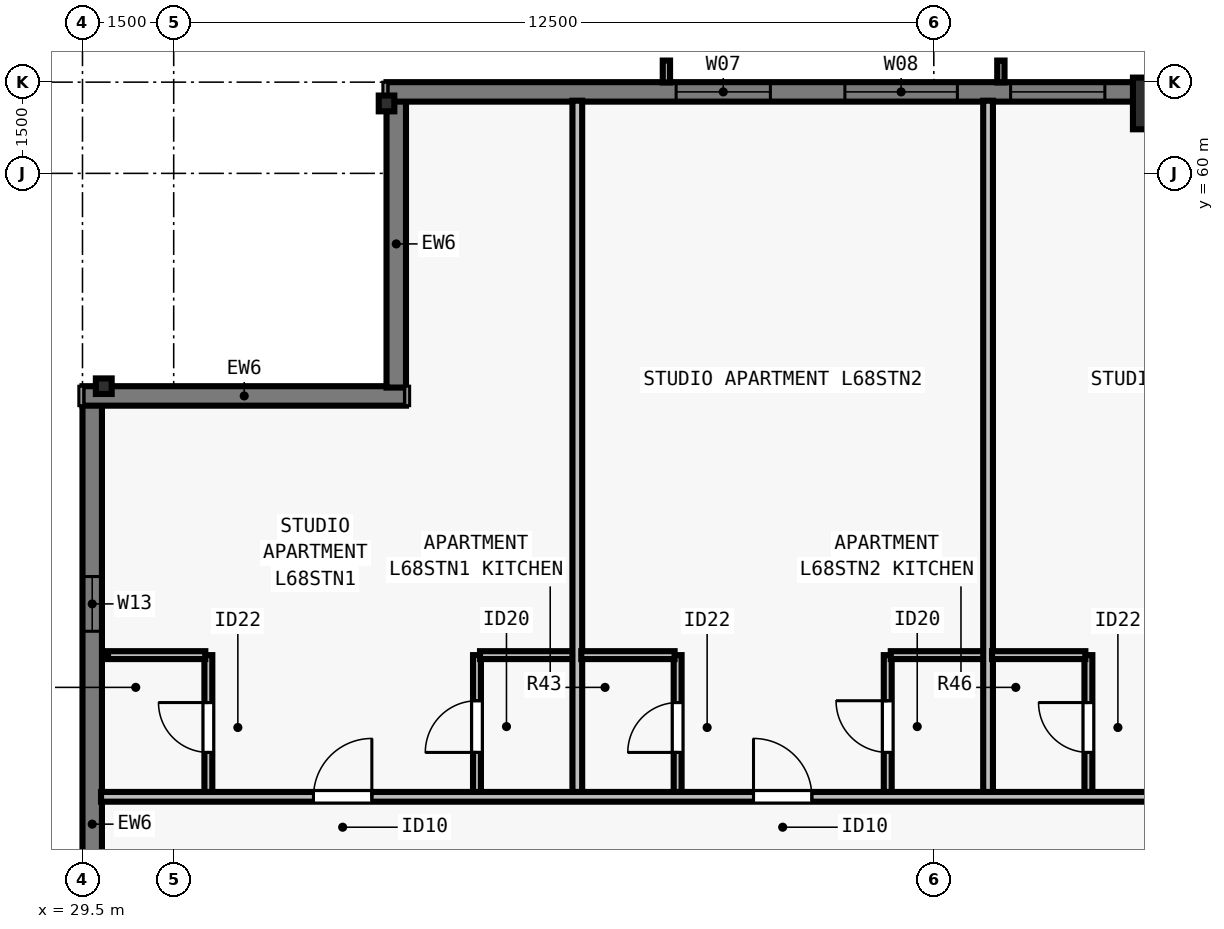
"""IFC4 building model, lengths in metres.
Left out: names, types, materials, properties, quantities, classifications, styles, units other than length and angle.
Written with IfcOpenShell. Run it as: python <this file> out.ifc"""

import sys

from ifc_helpers import new_model, si_unit, direction, frame, frame_2d, origin, origin_2d, place, context, subcontext, project, spatial, rectangle, i_section, extrude, element, fill, save


model = new_model("IFC4")
c1 = context("Model", 3, precision=1e-05, world=origin(), true_north=direction((0.0, 1.0)))
c2 = subcontext(c1, "Body", "Model", "MODEL_VIEW")
j1 = project(units=[si_unit("LENGTHUNIT", "METRE"), si_unit("PLANEANGLEUNIT", "RADIAN")], contexts=[c1])
p1 = place(None, origin())
s1 = spatial("IfcSite", under=j1, at=p1, CompositionType="ELEMENT")
p2 = place(p1, origin())
s2 = spatial("IfcBuilding", under=s1, at=p2, CompositionType="ELEMENT")
p3 = place(p2, frame((0.0, 0.0, 248.0)))
s3 = spatial("IfcBuildingStorey", under=s2, at=p3, CompositionType="ELEMENT", Elevation=248.0)
p4 = place(p3, frame((47.2, 61.15, 0.0), z_axis=(0.0, 0.0, 1.0), x_axis=(1.0, 0.0, 0.0)))
e1 = element("IfcColumn", 1, at=p4, inside=s3, PredefinedType="COLUMN", context=c2, shape_type="SweptSolid", body=[
    extrude(rectangle(XDim=0.85, YDim=0.85, at=origin_2d()), origin(), (0.0, 0.0, 1.0), 3.5),
])
for number, where, z_axis, x_axis in (
    (2, (34.5, 61.15, 0.0), (0.0, 0.0, 1.0), (1.0, 0.0, 0.0)),
    (3, (29.85, 56.5, 0.0), (0.0, 0.0, 1.0), (0.0, 1.0, 0.0)),
):
    element("IfcColumn", number, at=place(p3, frame(where, z_axis=z_axis, x_axis=x_axis)), inside=s3, PredefinedType="COLUMN", context=c2, shape_type="SweptSolid", body=[
        extrude(i_section(OverallWidth=0.256, OverallDepth=0.26, WebThickness=0.01, FlangeThickness=0.017, FilletRadius=0.013, at=origin_2d()), origin(), (0.0, 0.0, 1.0), 3.5),
    ])
p5 = place(p3, frame((29.66, 32.0, 0.0), z_axis=(0.0, 0.0, 1.0), x_axis=(0.0, 1.0, 0.0)))
e4 = element("IfcWall", 4, at=p5, inside=s3, PredefinedType="SOLIDWALL", context=c2, shape_type="SweptSolid", body=[
    extrude(rectangle(XDim=24.202, YDim=0.32, at=frame_2d((12.101, 0.0))), origin(), (0.0, 0.0, 1.0), 3.29),
])
p6 = place(p5, frame((4.275, 0.0, 0.8)))
e5 = element("IfcOpeningElement", 5, at=p6, cuts=e4, PredefinedType="OPENING", context=c2, shape_type="SweptSolid", body=[
    extrude(rectangle(XDim=1.55, YDim=1.678, at=frame_2d((0.775, 0.839))), frame((0.0, 0.17, 0.0), z_axis=(0.0, -1.0, 0.0), x_axis=(1.0, 0.0, 0.0)), (0.0, 0.0, 1.0), 0.34),
])
p7 = place(p5, frame((7.426, 0.0, 0.8)))
e6 = element("IfcOpeningElement", 6, at=p7, cuts=e4, PredefinedType="OPENING", context=c2, shape_type="SweptSolid", body=[
    extrude(rectangle(XDim=1.85, YDim=1.678, at=frame_2d((0.925, 0.839))), frame((0.0, 0.17, 0.0), z_axis=(0.0, -1.0, 0.0), x_axis=(1.0, 0.0, 0.0)), (0.0, 0.0, 1.0), 0.34),
])
p8 = place(p5, frame((12.576, 0.0, 0.8)))
e7 = element("IfcOpeningElement", 7, at=p8, cuts=e4, PredefinedType="OPENING", context=c2, shape_type="SweptSolid", body=[
    extrude(rectangle(XDim=1.55, YDim=1.678, at=frame_2d((0.775, 0.839))), frame((0.0, 0.17, 0.0), z_axis=(0.0, -1.0, 0.0), x_axis=(1.0, 0.0, 0.0)), (0.0, 0.0, 1.0), 0.34),
])
p9 = place(p5, frame((20.47, 0.0, 0.8)))
e8 = element("IfcOpeningElement", 8, at=p9, cuts=e4, PredefinedType="OPENING", context=c2, shape_type="SweptSolid", body=[
    extrude(rectangle(XDim=0.9, YDim=1.678, at=frame_2d((0.45, 0.839))), frame((0.0, 0.17, 0.0), z_axis=(0.0, -1.0, 0.0), x_axis=(1.0, 0.0, 0.0)), (0.0, 0.0, 1.0), 0.34),
])
p10 = place(p3, frame((29.5, 56.34, 0.0), z_axis=(0.0, 0.0, 1.0), x_axis=(1.0, 0.0, 0.0)))
e9 = element("IfcWall", 9, at=p10, inside=s3, PredefinedType="SOLIDWALL", context=c2, shape_type="SweptSolid", body=[
    extrude(rectangle(XDim=5.32, YDim=0.32, at=frame_2d((2.66, 0.0))), origin(), (0.0, 0.0, 1.0), 3.29),
])
p11 = place(p3, frame((34.66, 56.478, 0.0), z_axis=(0.0, 0.0, 1.0), x_axis=(0.0, 1.0, 0.0)))
e10 = element("IfcWall", 10, at=p11, inside=s3, PredefinedType="SOLIDWALL", context=c2, shape_type="SweptSolid", body=[
    extrude(rectangle(XDim=4.724, YDim=0.32, at=frame_2d((2.362, 0.0))), origin(), (0.0, 0.0, 1.0), 3.29),
])
p12 = place(p3, frame((34.5, 61.34, 0.0), z_axis=(0.0, 0.0, 1.0), x_axis=(1.0, 0.0, 0.0)))
e11 = element("IfcWall", 11, at=p12, inside=s3, PredefinedType="SOLIDWALL", context=c2, shape_type="SweptSolid", body=[
    extrude(rectangle(XDim=34.702, YDim=0.32, at=frame_2d((17.351, 0.0))), origin(), (0.0, 0.0, 1.0), 3.29),
])
p13 = place(p12, frame((4.763, 0.0, 0.8)))
e12 = element("IfcOpeningElement", 12, at=p13, cuts=e11, PredefinedType="OPENING", context=c2, shape_type="SweptSolid", body=[
    extrude(rectangle(XDim=1.55, YDim=1.678, at=frame_2d((0.775, 0.839))), frame((0.0, 0.17, 0.0), z_axis=(0.0, -1.0, 0.0), x_axis=(1.0, 0.0, 0.0)), (0.0, 0.0, 1.0), 0.34),
])
p14 = place(p12, frame((7.538, 0.0, 0.8)))
e13 = element("IfcOpeningElement", 13, at=p14, cuts=e11, PredefinedType="OPENING", context=c2, shape_type="SweptSolid", body=[
    extrude(rectangle(XDim=1.85, YDim=1.678, at=frame_2d((0.925, 0.839))), frame((0.0, 0.17, 0.0), z_axis=(0.0, -1.0, 0.0), x_axis=(1.0, 0.0, 0.0)), (0.0, 0.0, 1.0), 0.34),
])
p15 = place(p12, frame((10.263, 0.0, 0.8)))
e14 = element("IfcOpeningElement", 14, at=p15, cuts=e11, PredefinedType="OPENING", context=c2, shape_type="SweptSolid", body=[
    extrude(rectangle(XDim=1.55, YDim=1.678, at=frame_2d((0.775, 0.839))), frame((0.0, 0.17, 0.0), z_axis=(0.0, -1.0, 0.0), x_axis=(1.0, 0.0, 0.0)), (0.0, 0.0, 1.0), 0.34),
])
p16 = place(p12, frame((14.738, 0.0, 0.8)))
e15 = element("IfcOpeningElement", 15, at=p16, cuts=e11, PredefinedType="OPENING", context=c2, shape_type="SweptSolid", body=[
    extrude(rectangle(XDim=1.85, YDim=1.678, at=frame_2d((0.925, 0.839))), frame((0.0, 0.17, 0.0), z_axis=(0.0, -1.0, 0.0), x_axis=(1.0, 0.0, 0.0)), (0.0, 0.0, 1.0), 0.34),
])
p17 = place(p12, frame((18.264, 0.0, 0.8)))
e16 = element("IfcOpeningElement", 16, at=p17, cuts=e11, PredefinedType="OPENING", context=c2, shape_type="SweptSolid", body=[
    extrude(rectangle(XDim=1.55, YDim=1.678, at=frame_2d((0.775, 0.839))), frame((0.0, 0.17, 0.0), z_axis=(0.0, -1.0, 0.0), x_axis=(1.0, 0.0, 0.0)), (0.0, 0.0, 1.0), 0.34),
])
p18 = place(p12, frame((25.014, 0.0, 0.8)))
e17 = element("IfcOpeningElement", 17, at=p18, cuts=e11, PredefinedType="OPENING", context=c2, shape_type="SweptSolid", body=[
    extrude(rectangle(XDim=1.55, YDim=1.678, at=frame_2d((0.775, 0.839))), frame((0.0, 0.17, 0.0), z_axis=(0.0, -1.0, 0.0), x_axis=(1.0, 0.0, 0.0)), (0.0, 0.0, 1.0), 0.34),
])
p19 = place(p12, frame((28.24, 0.0, 0.8)))
e18 = element("IfcOpeningElement", 18, at=p19, cuts=e11, PredefinedType="OPENING", context=c2, shape_type="SweptSolid", body=[
    extrude(rectangle(XDim=1.85, YDim=1.678, at=frame_2d((0.925, 0.839))), frame((0.0, 0.17, 0.0), z_axis=(0.0, -1.0, 0.0), x_axis=(1.0, 0.0, 0.0)), (0.0, 0.0, 1.0), 0.34),
])
p20 = place(p3, frame((29.805, 49.748, 0.0), z_axis=(0.0, 0.0, 1.0), x_axis=(1.0, 0.0, 0.0)))
e19 = element("IfcWall", 19, at=p20, inside=s3, PredefinedType="PARTITIONING", context=c2, shape_type="SweptSolid", body=[
    extrude(rectangle(XDim=44.39, YDim=0.16, at=frame_2d((22.195, 0.0))), origin(), (0.0, 0.0, 1.0), 2.958),
])
p21 = place(p20, frame((3.494, 0.0, 0.0)))
e20 = element("IfcOpeningElement", 20, at=p21, cuts=e19, PredefinedType="OPENING", context=c2, shape_type="SweptSolid", body=[
    extrude(rectangle(XDim=0.96, YDim=2.18, at=frame_2d((0.48, 1.09))), frame((0.0, 0.09, 0.0), z_axis=(0.0, -1.0, 0.0), x_axis=(1.0, 0.0, 0.0)), (0.0, 0.0, 1.0), 0.18),
])
p22 = place(p20, frame((10.73, 0.0, 0.0)))
e21 = element("IfcOpeningElement", 21, at=p22, cuts=e19, PredefinedType="OPENING", context=c2, shape_type="SweptSolid", body=[
    extrude(rectangle(XDim=0.96, YDim=2.18, at=frame_2d((0.48, 1.09))), frame((0.0, 0.09, 0.0), z_axis=(0.0, -1.0, 0.0), x_axis=(1.0, 0.0, 0.0)), (0.0, 0.0, 1.0), 0.18),
])
p23 = place(p20, frame((18.09, 0.0, 0.0)))
e22 = element("IfcOpeningElement", 22, at=p23, cuts=e19, PredefinedType="OPENING", context=c2, shape_type="SweptSolid", body=[
    extrude(rectangle(XDim=0.96, YDim=2.18, at=frame_2d((0.48, 1.09))), frame((0.0, 0.09, 0.0), z_axis=(0.0, -1.0, 0.0), x_axis=(1.0, 0.0, 0.0)), (0.0, 0.0, 1.0), 0.18),
])
p24 = place(p20, frame((25.45, 0.0, 0.0)))
e23 = element("IfcOpeningElement", 23, at=p24, cuts=e19, PredefinedType="OPENING", context=c2, shape_type="SweptSolid", body=[
    extrude(rectangle(XDim=0.96, YDim=2.18, at=frame_2d((0.48, 1.09))), frame((0.0, 0.09, 0.0), z_axis=(0.0, -1.0, 0.0), x_axis=(1.0, 0.0, 0.0)), (0.0, 0.0, 1.0), 0.18),
])
p25 = place(p20, frame((32.81, 0.0, 0.0)))
e24 = element("IfcOpeningElement", 24, at=p25, cuts=e19, PredefinedType="OPENING", context=c2, shape_type="SweptSolid", body=[
    extrude(rectangle(XDim=0.96, YDim=2.18, at=frame_2d((0.48, 1.09))), frame((0.0, 0.09, 0.0), z_axis=(0.0, -1.0, 0.0), x_axis=(1.0, 0.0, 0.0)), (0.0, 0.0, 1.0), 0.18),
])
p26 = place(p20, frame((40.294, 0.0, 0.0)))
e25 = element("IfcOpeningElement", 25, at=p26, cuts=e19, PredefinedType="OPENING", context=c2, shape_type="SweptSolid", body=[
    extrude(rectangle(XDim=0.96, YDim=2.18, at=frame_2d((0.48, 1.09))), frame((0.0, 0.09, 0.0), z_axis=(0.0, -1.0, 0.0), x_axis=(1.0, 0.0, 0.0)), (0.0, 0.0, 1.0), 0.18),
])
p27 = place(p3, frame((31.57, 49.827, 0.0), z_axis=(0.0, 0.0, 1.0), x_axis=(0.0, 1.0, 0.0)))
e26 = element("IfcWall", 26, at=p27, inside=s3, PredefinedType="PLUMBINGWALL", context=c2, shape_type="SweptSolid", body=[
    extrude(rectangle(XDim=2.25, YDim=0.13, at=frame_2d((1.125, 0.0))), origin(), (0.0, 0.0, 1.0), 3.29),
])
p28 = place(p27, frame((0.65, 0.0, 0.0)))
e27 = element("IfcOpeningElement", 27, at=p28, cuts=e26, PredefinedType="OPENING", context=c2, shape_type="SweptSolid", body=[
    extrude(rectangle(XDim=0.82, YDim=2.1, at=frame_2d((0.41, 1.05))), frame((0.0, 0.075, 0.0), z_axis=(0.0, -1.0, 0.0), x_axis=(1.0, 0.0, 0.0)), (0.0, 0.0, 1.0), 0.15),
])
p29 = place(p3, frame((29.92, 52.077, 0.0), z_axis=(0.0, 0.0, 1.0), x_axis=(1.0, 0.0, 0.0)))
e28 = element("IfcWall", 28, at=p29, inside=s3, PredefinedType="PLUMBINGWALL", context=c2, shape_type="SweptSolid", body=[
    extrude(rectangle(XDim=1.6, YDim=0.13, at=frame_2d((0.8, 0.0))), origin(), (0.0, 0.0, 1.0), 3.29),
])
p30 = place(p3, frame((35.988, 49.827, 0.0), z_axis=(0.0, 0.0, 1.0), x_axis=(0.0, 1.0, 0.0)))
e29 = element("IfcWall", 29, at=p30, inside=s3, PredefinedType="PLUMBINGWALL", context=c2, shape_type="SweptSolid", body=[
    extrude(rectangle(XDim=2.25, YDim=0.13, at=frame_2d((1.125, 0.0))), origin(), (0.0, 0.0, 1.0), 3.29),
])
p31 = place(p30, frame((0.65, 0.0, 0.0)))
e30 = element("IfcOpeningElement", 30, at=p31, cuts=e29, PredefinedType="OPENING", context=c2, shape_type="SweptSolid", body=[
    extrude(rectangle(XDim=0.85, YDim=2.1, at=frame_2d((0.425, 1.05))), frame((0.0, 0.075, 0.0), z_axis=(0.0, -1.0, 0.0), x_axis=(1.0, 0.0, 0.0)), (0.0, 0.0, 1.0), 0.15),
])
p32 = place(p3, frame((36.038, 52.077, 0.0), z_axis=(0.0, 0.0, 1.0), x_axis=(1.0, 0.0, 0.0)))
e31 = element("IfcWall", 31, at=p32, inside=s3, PredefinedType="PLUMBINGWALL", context=c2, shape_type="SweptSolid", body=[
    extrude(rectangle(XDim=1.6, YDim=0.13, at=frame_2d((0.8, 0.0))), origin(), (0.0, 0.0, 1.0), 2.958),
])
p33 = place(p3, frame((37.637, 49.827, 0.0), z_axis=(0.0, 0.0, 1.0), x_axis=(0.0, 1.0, 0.0)))
e32 = element("IfcWall", 32, at=p33, inside=s3, PredefinedType="PARTITIONING", context=c2, shape_type="SweptSolid", body=[
    extrude(rectangle(XDim=11.368, YDim=0.16, at=frame_2d((5.684, 0.0))), origin(), (0.0, 0.0, 1.0), 2.573),
])
p34 = place(p3, frame((39.288, 49.827, 0.0), z_axis=(0.0, 0.0, 1.0), x_axis=(0.0, 1.0, 0.0)))
e33 = element("IfcWall", 33, at=p34, inside=s3, PredefinedType="PLUMBINGWALL", context=c2, shape_type="SweptSolid", body=[
    extrude(rectangle(XDim=2.25, YDim=0.13, at=frame_2d((1.125, 0.0))), origin(), (0.0, 0.0, 1.0), 3.29),
])
p35 = place(p34, frame((0.65, 0.0, 0.0)))
e34 = element("IfcOpeningElement", 34, at=p35, cuts=e33, PredefinedType="OPENING", context=c2, shape_type="SweptSolid", body=[
    extrude(rectangle(XDim=0.82, YDim=2.1, at=frame_2d((0.41, 1.05))), frame((0.0, 0.075, 0.0), z_axis=(0.0, -1.0, 0.0), x_axis=(1.0, 0.0, 0.0)), (0.0, 0.0, 1.0), 0.15),
])
p36 = place(p3, frame((37.702, 52.077, 0.0), z_axis=(0.0, 0.0, 1.0), x_axis=(1.0, 0.0, 0.0)))
e35 = element("IfcWall", 35, at=p36, inside=s3, PredefinedType="PLUMBINGWALL", context=c2, shape_type="SweptSolid", body=[
    extrude(rectangle(XDim=1.535, YDim=0.13, at=frame_2d((0.768, 0.0))), origin(), (0.0, 0.0, 1.0), 3.29),
])
p37 = place(p3, frame((42.742, 49.827, 0.0), z_axis=(0.0, 0.0, 1.0), x_axis=(0.0, 1.0, 0.0)))
e36 = element("IfcWall", 36, at=p37, inside=s3, PredefinedType="PLUMBINGWALL", context=c2, shape_type="SweptSolid", body=[
    extrude(rectangle(XDim=2.25, YDim=0.13, at=frame_2d((1.125, 0.0))), origin(), (0.0, 0.0, 1.0), 3.29),
])
p38 = place(p37, frame((0.65, 0.0, 0.0)))
e37 = element("IfcOpeningElement", 37, at=p38, cuts=e36, PredefinedType="OPENING", context=c2, shape_type="SweptSolid", body=[
    extrude(rectangle(XDim=0.85, YDim=2.1, at=frame_2d((0.425, 1.05))), frame((0.0, 0.075, 0.0), z_axis=(0.0, -1.0, 0.0), x_axis=(1.0, 0.0, 0.0)), (0.0, 0.0, 1.0), 0.15),
])
p39 = place(p3, frame((42.792, 52.077, 0.0), z_axis=(0.0, 0.0, 1.0), x_axis=(1.0, 0.0, 0.0)))
e38 = element("IfcWall", 38, at=p39, inside=s3, PredefinedType="PLUMBINGWALL", context=c2, shape_type="SweptSolid", body=[
    extrude(rectangle(XDim=1.6, YDim=0.13, at=frame_2d((0.8, 0.0))), origin(), (0.0, 0.0, 1.0), 3.29),
])
p40 = place(p3, frame((44.393, 49.827, 0.0), z_axis=(0.0, 0.0, 1.0), x_axis=(0.0, 1.0, 0.0)))
e39 = element("IfcWall", 39, at=p40, inside=s3, PredefinedType="PARTITIONING", context=c2, shape_type="SweptSolid", body=[
    extrude(rectangle(XDim=11.368, YDim=0.16, at=frame_2d((5.684, 0.0))), origin(), (0.0, 0.0, 1.0), 3.29),
])
p41 = place(p3, frame((46.042, 49.827, 0.0), z_axis=(0.0, 0.0, 1.0), x_axis=(0.0, 1.0, 0.0)))
e40 = element("IfcWall", 40, at=p41, inside=s3, PredefinedType="PLUMBINGWALL", context=c2, shape_type="SweptSolid", body=[
    extrude(rectangle(XDim=2.25, YDim=0.13, at=frame_2d((1.125, 0.0))), origin(), (0.0, 0.0, 1.0), 3.29),
])
p42 = place(p41, frame((0.65, 0.0, 0.0)))
e41 = element("IfcOpeningElement", 41, at=p42, cuts=e40, PredefinedType="OPENING", context=c2, shape_type="SweptSolid", body=[
    extrude(rectangle(XDim=0.82, YDim=2.1, at=frame_2d((0.41, 1.05))), frame((0.0, 0.075, 0.0), z_axis=(0.0, -1.0, 0.0), x_axis=(1.0, 0.0, 0.0)), (0.0, 0.0, 1.0), 0.15),
])
p43 = place(p3, frame((44.458, 52.077, 0.0), z_axis=(0.0, 0.0, 1.0), x_axis=(1.0, 0.0, 0.0)))
e42 = element("IfcWall", 42, at=p43, inside=s3, PredefinedType="PLUMBINGWALL", context=c2, shape_type="SweptSolid", body=[
    extrude(rectangle(XDim=1.535, YDim=0.13, at=frame_2d((0.768, 0.0))), origin(), (0.0, 0.0, 1.0), 3.29),
])
p44 = place(p13, origin())
e43 = element("IfcWindow", 43, at=p44, inside=s3, PartitioningType="SINGLE_PANEL", PredefinedType="WINDOW", context=c2, shape_type="SweptSolid", body=[
    extrude(rectangle(XDim=1.55, YDim=1.678, at=frame_2d((0.775, 0.839))), frame((0.0, -0.05, 0.0), z_axis=(0.0, -1.0, 0.0), x_axis=(1.0, 0.0, 0.0)), (0.0, 0.0, 1.0), 0.06),
])
fill(e12, e43)
p45 = place(p14, origin())
e44 = element("IfcWindow", 44, at=p45, inside=s3, PartitioningType="SINGLE_PANEL", PredefinedType="WINDOW", context=c2, shape_type="SweptSolid", body=[
    extrude(rectangle(XDim=1.85, YDim=1.678, at=frame_2d((0.925, 0.839))), frame((0.0, -0.05, 0.0), z_axis=(0.0, -1.0, 0.0), x_axis=(1.0, 0.0, 0.0)), (0.0, 0.0, 1.0), 0.06),
])
fill(e13, e44)
p46 = place(p15, origin())
e45 = element("IfcWindow", 45, at=p46, inside=s3, PartitioningType="SINGLE_PANEL", PredefinedType="WINDOW", context=c2, shape_type="SweptSolid", body=[
    extrude(rectangle(XDim=1.55, YDim=1.678, at=frame_2d((0.775, 0.839))), frame((0.0, -0.05, 0.0), z_axis=(0.0, -1.0, 0.0), x_axis=(1.0, 0.0, 0.0)), (0.0, 0.0, 1.0), 0.06),
])
fill(e14, e45)
p47 = place(p9, origin())
e46 = element("IfcWindow", 46, at=p47, inside=s3, PartitioningType="SINGLE_PANEL", PredefinedType="WINDOW", context=c2, shape_type="SweptSolid", body=[
    extrude(rectangle(XDim=0.9, YDim=1.678, at=frame_2d((0.45, 0.839))), frame((0.0, -0.04, 0.0), z_axis=(0.0, -1.0, 0.0), x_axis=(1.0, 0.0, 0.0)), (0.0, 0.0, 1.0), 0.06),
])
fill(e8, e46)
p48 = place(p28, origin())
e47 = element("IfcDoor", 47, at=p48, inside=s3, OperationType="SINGLE_SWING_RIGHT", PredefinedType="DOOR", context=c2, shape_type="SweptSolid", body=[
    extrude(rectangle(XDim=0.82, YDim=2.1, at=frame_2d((0.41, 1.05))), frame((0.0, 0.025, 0.0), z_axis=(0.0, -1.0, 0.0), x_axis=(1.0, 0.0, 0.0)), (0.0, 0.0, 1.0), 0.05),
])
fill(e27, e47)
p49 = place(p31, origin())
e48 = element("IfcDoor", 48, at=p49, inside=s3, OperationType="SINGLE_SWING_LEFT", PredefinedType="DOOR", context=c2, shape_type="SweptSolid", body=[
    extrude(rectangle(XDim=0.85, YDim=2.1, at=frame_2d((0.425, 1.05))), frame((0.0, 0.025, 0.0), z_axis=(0.0, -1.0, 0.0), x_axis=(1.0, 0.0, 0.0)), (0.0, 0.0, 1.0), 0.05),
])
fill(e30, e48)
p50 = place(p21, origin())
e49 = element("IfcDoor", 49, at=p50, inside=s3, OperationType="SINGLE_SWING_RIGHT", PredefinedType="DOOR", context=c2, shape_type="SweptSolid", body=[
    extrude(rectangle(XDim=0.96, YDim=2.18, at=frame_2d((0.48, 1.09))), frame((0.0, 0.025, 0.0), z_axis=(0.0, -1.0, 0.0), x_axis=(1.0, 0.0, 0.0)), (0.0, 0.0, 1.0), 0.05),
])
fill(e20, e49)
p51 = place(p35, origin())
e50 = element("IfcDoor", 50, at=p51, inside=s3, OperationType="SINGLE_SWING_LEFT", PredefinedType="DOOR", context=c2, shape_type="SweptSolid", body=[
    extrude(rectangle(XDim=0.82, YDim=2.1, at=frame_2d((0.41, 1.05))), frame((0.0, 0.025, 0.0), z_axis=(0.0, -1.0, 0.0), x_axis=(1.0, 0.0, 0.0)), (0.0, 0.0, 1.0), 0.05),
])
fill(e34, e50)
p52 = place(p38, origin())
e51 = element("IfcDoor", 51, at=p52, inside=s3, OperationType="SINGLE_SWING_RIGHT", PredefinedType="DOOR", context=c2, shape_type="SweptSolid", body=[
    extrude(rectangle(XDim=0.85, YDim=2.1, at=frame_2d((0.425, 1.05))), frame((0.0, 0.025, 0.0), z_axis=(0.0, -1.0, 0.0), x_axis=(1.0, 0.0, 0.0)), (0.0, 0.0, 1.0), 0.05),
])
fill(e37, e51)
p53 = place(p22, origin())
e52 = element("IfcDoor", 52, at=p53, inside=s3, OperationType="SINGLE_SWING_LEFT", PredefinedType="DOOR", context=c2, shape_type="SweptSolid", body=[
    extrude(rectangle(XDim=0.96, YDim=2.18, at=frame_2d((0.48, 1.09))), frame((0.0, 0.025, 0.0), z_axis=(0.0, -1.0, 0.0), x_axis=(1.0, 0.0, 0.0)), (0.0, 0.0, 1.0), 0.05),
])
fill(e21, e52)
p54 = place(p42, origin())
e53 = element("IfcDoor", 53, at=p54, inside=s3, OperationType="SINGLE_SWING_RIGHT", PredefinedType="DOOR", context=c2, shape_type="SweptSolid", body=[
    extrude(rectangle(XDim=0.82, YDim=2.1, at=frame_2d((0.41, 1.05))), frame((0.0, 0.025, 0.0), z_axis=(0.0, -1.0, 0.0), x_axis=(1.0, 0.0, 0.0)), (0.0, 0.0, 1.0), 0.05),
])
fill(e41, e53)
save(model, sys.argv[1])
